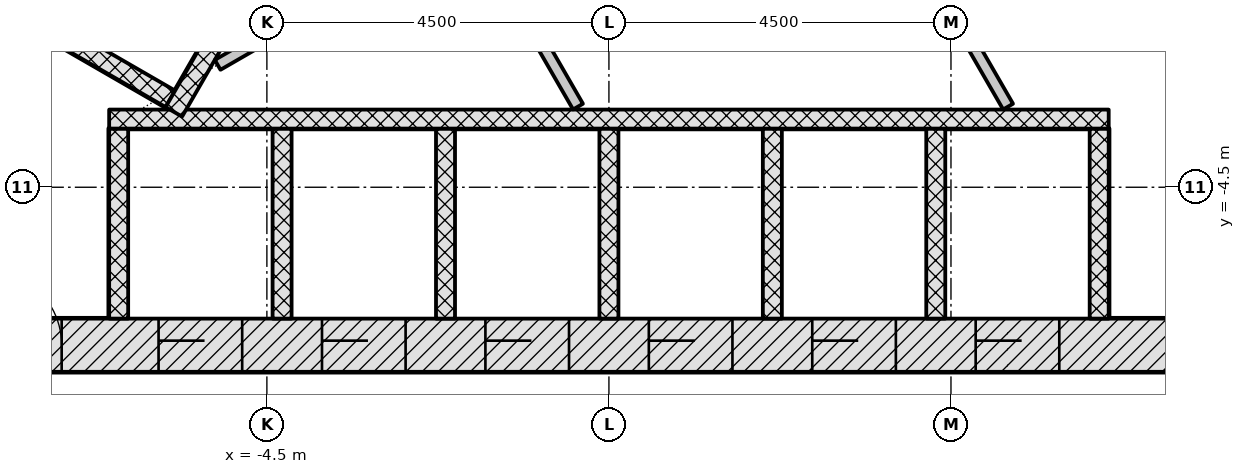
"""IFC4 building model, lengths in metres.
Left out: names, types, materials, properties, quantities, classifications, styles, units other than length and angle.
Written with IfcOpenShell. Run it as: python <this file> out.ifc"""

import sys

from ifc_helpers import new_model, si_unit, direction, frame, frame_2d, origin, place, context, subcontext, project, spatial, rectangle, extrude, element, fill, save


model = new_model("IFC4")
c1 = context("Model", 3, precision=1e-05, world=origin(), true_north=direction((0.0, 1.0)))
c2 = subcontext(c1, "Body", "Model", "MODEL_VIEW")
j1 = project(units=[si_unit("LENGTHUNIT", "METRE"), si_unit("PLANEANGLEUNIT", "RADIAN")], contexts=[c1])
p1 = place(None, origin())
s1 = spatial("IfcSite", under=j1, at=p1, CompositionType="ELEMENT")
p2 = place(p1, origin())
s2 = spatial("IfcBuilding", under=s1, at=p2, CompositionType="ELEMENT")
p3 = place(p2, frame((0.0, 0.0, 72.6)))
s3 = spatial("IfcBuildingStorey", under=s2, at=p3, CompositionType="ELEMENT", Elevation=72.6)
p4 = place(p3, frame((-9.229, -6.578, -0.2), z_axis=(0.0, 0.0, 1.0), x_axis=(1.0, 0.0, 0.0)))
e1 = element("IfcWall", 1, at=p4, inside=s3, PredefinedType="SHEAR", context=c2, shape_type="SweptSolid", body=[
    extrude(rectangle(XDim=18.458, YDim=0.7, at=frame_2d((9.229, 0.0))), origin(), (0.0, 0.0, 1.0), 3.6),
])
p5 = place(p4, frame((3.304, 0.0, 0.2)))
e2 = element("IfcOpeningElement", 2, at=p5, cuts=e1, PredefinedType="OPENING", context=c2, shape_type="SweptSolid", body=[
    extrude(rectangle(XDim=1.1, YDim=2.1, at=frame_2d((0.55, 1.05))), frame((0.0, 0.36, 0.0), z_axis=(0.0, -1.0, 0.0), x_axis=(1.0, 0.0, 0.0)), (0.0, 0.0, 1.0), 0.72),
])
p6 = place(p4, frame((5.454, 0.0, 0.2)))
e3 = element("IfcOpeningElement", 3, at=p6, cuts=e1, PredefinedType="OPENING", context=c2, shape_type="SweptSolid", body=[
    extrude(rectangle(XDim=1.1, YDim=2.1, at=frame_2d((0.55, 1.05))), frame((0.0, 0.36, 0.0), z_axis=(0.0, -1.0, 0.0), x_axis=(1.0, 0.0, 0.0)), (0.0, 0.0, 1.0), 0.72),
])
p7 = place(p4, frame((7.604, 0.0, 0.2)))
e4 = element("IfcOpeningElement", 4, at=p7, cuts=e1, PredefinedType="OPENING", context=c2, shape_type="SweptSolid", body=[
    extrude(rectangle(XDim=1.1, YDim=2.1, at=frame_2d((0.55, 1.05))), frame((0.0, 0.36, 0.0), z_axis=(0.0, -1.0, 0.0), x_axis=(1.0, 0.0, 0.0)), (0.0, 0.0, 1.0), 0.72),
])
p8 = place(p4, frame((9.754, 0.0, 0.2)))
e5 = element("IfcOpeningElement", 5, at=p8, cuts=e1, PredefinedType="OPENING", context=c2, shape_type="SweptSolid", body=[
    extrude(rectangle(XDim=1.1, YDim=2.1, at=frame_2d((0.55, 1.05))), frame((0.0, 0.36, 0.0), z_axis=(0.0, -1.0, 0.0), x_axis=(1.0, 0.0, 0.0)), (0.0, 0.0, 1.0), 0.72),
])
p9 = place(p4, frame((11.904, 0.0, 0.2)))
e6 = element("IfcOpeningElement", 6, at=p9, cuts=e1, PredefinedType="OPENING", context=c2, shape_type="SweptSolid", body=[
    extrude(rectangle(XDim=1.1, YDim=2.1, at=frame_2d((0.55, 1.05))), frame((0.0, 0.36, 0.0), z_axis=(0.0, -1.0, 0.0), x_axis=(1.0, 0.0, 0.0)), (0.0, 0.0, 1.0), 0.72),
])
p10 = place(p4, frame((14.054, 0.0, 0.2)))
e7 = element("IfcOpeningElement", 7, at=p10, cuts=e1, PredefinedType="OPENING", context=c2, shape_type="SweptSolid", body=[
    extrude(rectangle(XDim=1.1, YDim=2.1, at=frame_2d((0.55, 1.05))), frame((0.0, 0.36, 0.0), z_axis=(0.0, -1.0, 0.0), x_axis=(1.0, 0.0, 0.0)), (0.0, 0.0, 1.0), 0.72),
])
p11 = place(p4, frame((1.029, 0.0, 0.2)))
e8 = element("IfcOpeningElement", 8, at=p11, cuts=e1, PredefinedType="OPENING", context=c2, shape_type="SweptSolid", body=[
    extrude(rectangle(XDim=1.0, YDim=2.1, at=frame_2d((0.5, 1.05))), frame((0.0, 0.36, 0.0), z_axis=(0.0, -1.0, 0.0), x_axis=(1.0, 0.0, 0.0)), (0.0, 0.0, 1.0), 0.72),
])
p12 = place(p3, frame((10.311, -4.703, -0.2), z_axis=(0.0, 0.0, 1.0), x_axis=(-0.500001446645, 0.866024568562, 0.0)))
e9 = element("IfcWall", 9, at=p12, inside=s3, PredefinedType="SHEAR", context=c2, shape_type="SweptSolid", body=[
    extrude(rectangle(XDim=18.458, YDim=0.7, at=frame_2d((9.229, 0.0))), origin(), (0.0, 0.0, 1.0), 3.6),
])
p13 = place(p12, frame((9.5, 0.0, 0.2)))
e10 = element("IfcOpeningElement", 10, at=p13, cuts=e9, PredefinedType="OPENING", context=c2, shape_type="SweptSolid", body=[
    extrude(rectangle(XDim=1.0, YDim=2.1, at=frame_2d((0.5, 1.05))), frame((0.0, 0.36, 0.0), z_axis=(0.0, -1.0, 0.0), x_axis=(1.0, 0.0, 0.0)), (0.0, 0.0, 1.0), 0.72),
])
p14 = place(p12, frame((4.402, 0.0, 0.2)))
e11 = element("IfcOpeningElement", 11, at=p14, cuts=e9, PredefinedType="OPENING", context=c2, shape_type="SweptSolid", body=[
    extrude(rectangle(XDim=0.9, YDim=2.1, at=frame_2d((0.45, 1.05))), frame((0.0, 0.36, 0.0), z_axis=(0.0, -1.0, 0.0), x_axis=(1.0, 0.0, 0.0)), (0.0, 0.0, 1.0), 0.72),
])
p15 = place(p12, frame((13.927, 0.0, 0.2)))
e12 = element("IfcOpeningElement", 12, at=p15, cuts=e9, PredefinedType="OPENING", context=c2, shape_type="SweptSolid", body=[
    extrude(rectangle(XDim=0.9, YDim=2.1, at=frame_2d((0.45, 1.05))), frame((0.0, 0.36, 0.0), z_axis=(0.0, -1.0, 0.0), x_axis=(1.0, 0.0, 0.0)), (0.0, 0.0, 1.0), 0.72),
])
p16 = place(p3, frame((-1.083, 11.281, -0.2), z_axis=(0.0, 0.0, 1.0), x_axis=(-0.500001446645, -0.866024568562, 0.0)))
e13 = element("IfcWall", 13, at=p16, inside=s3, PredefinedType="SHEAR", context=c2, shape_type="SweptSolid", body=[
    extrude(rectangle(XDim=18.458, YDim=0.7, at=frame_2d((9.229, 0.0))), origin(), (0.0, 0.0, 1.0), 3.6),
])
p17 = place(p16, frame((8.979, 0.0, 0.2)))
e14 = element("IfcOpeningElement", 14, at=p17, cuts=e13, PredefinedType="OPENING", context=c2, shape_type="SweptSolid", body=[
    extrude(rectangle(XDim=1.2, YDim=2.1, at=frame_2d((0.6, 1.05))), frame((0.0, 0.36, 0.0), z_axis=(0.0, -1.0, 0.0), x_axis=(1.0, 0.0, 0.0)), (0.0, 0.0, 1.0), 0.72),
])
p18 = place(p16, frame((11.029, 0.0, 0.2)))
e15 = element("IfcOpeningElement", 15, at=p18, cuts=e13, PredefinedType="OPENING", context=c2, shape_type="SweptSolid", body=[
    extrude(rectangle(XDim=1.2, YDim=2.1, at=frame_2d((0.6, 1.05))), frame((0.0, 0.36, 0.0), z_axis=(0.0, -1.0, 0.0), x_axis=(1.0, 0.0, 0.0)), (0.0, 0.0, 1.0), 0.72),
])
for number, where, z_axis, x_axis in (
    (16, (-6.45, -6.228, -0.2), (0.0, 0.0, 1.0), (0.0, 1.0, 0.0)),
    (17, (-4.3, -6.228, -0.2), (0.0, 0.0, 1.0), (0.0, 1.0, 0.0)),
    (18, (-2.15, -6.228, -0.2), (0.0, 0.0, 1.0), (0.0, 1.0, 0.0)),
    (19, (0.0, -6.228, -0.2), (0.0, 0.0, 1.0), (0.0, 1.0, 0.0)),
    (20, (2.15, -6.228, -0.2), (0.0, 0.0, 1.0), (0.0, 1.0, 0.0)),
    (21, (4.3, -6.228, -0.2), (0.0, 0.0, 1.0), (0.0, 1.0, 0.0)),
    (22, (6.45, -6.228, -0.2), (0.0, 0.0, 1.0), (0.0, 1.0, 0.0)),
):
    element("IfcWall", number, at=place(p3, frame(where, z_axis=z_axis, x_axis=x_axis)), inside=s3, PredefinedType="PARTITIONING", context=c2, shape_type="SweptSolid", body=[
        extrude(rectangle(XDim=2.5, YDim=0.25, at=frame_2d((1.25, 0.0))), origin(), (0.0, 0.0, 1.0), 3.6),
    ])
p19 = place(p3, frame((-6.575, -3.603, 0.0), z_axis=(0.0, 0.0, 1.0), x_axis=(1.0, 0.0, 0.0)))
e23 = element("IfcWall", 23, at=p19, inside=s3, PredefinedType="PARTITIONING", context=c2, shape_type="SweptSolid", body=[
    extrude(rectangle(XDim=13.15, YDim=0.25, at=frame_2d((6.575, 0.0))), origin(), (0.0, 0.0, 1.0), 3.4),
])
p20 = place(p3, frame((-8.281, -1.887, -0.2), z_axis=(0.0, 0.0, 1.0), x_axis=(0.866032775405, -0.499987231761, 0.0)))
e24 = element("IfcWall", 24, at=p20, inside=s3, PredefinedType="PARTITIONING", context=c2, shape_type="SweptSolid", body=[
    extrude(rectangle(XDim=2.9, YDim=0.25, at=frame_2d((1.45, 0.0))), origin(), (0.0, 0.0, 1.0), 3.6),
])
p21 = place(p3, frame((0.176, 6.711, 0.0), z_axis=(0.0, 0.0, 1.0), x_axis=(-0.500004227369, -0.866022963098, 0.0)))
e25 = element("IfcWall", 25, at=p21, inside=s3, PredefinedType="PARTITIONING", context=c2, shape_type="SweptSolid", body=[
    extrude(rectangle(XDim=11.8, YDim=0.25, at=frame_2d((5.9, 0.0))), origin(), (0.0, 0.0, 1.0), 3.4),
])
p22 = place(p3, frame((-5.148, -2.89, 0.0), z_axis=(0.0, 0.0, 1.0), x_axis=(0.866030081544, 0.499991897794, 0.0)))
e26 = element("IfcWall", 26, at=p22, inside=s3, PredefinedType="PARTITIONING", context=c2, shape_type="SweptSolid", body=[
    extrude(rectangle(XDim=12.131, YDim=0.15, at=frame_2d((6.065, 0.0))), origin(), (0.0, 0.0, 1.0), 3.4),
])
p23 = place(p22, frame((5.831, 0.0, 0.0)))
e27 = element("IfcOpeningElement", 27, at=p23, cuts=e26, PredefinedType="OPENING", context=c2, shape_type="SweptSolid", body=[
    extrude(rectangle(XDim=0.9, YDim=2.1, at=frame_2d((0.45, 1.05))), frame((0.0, 0.085, 0.0), z_axis=(0.0, -1.0, 0.0), x_axis=(1.0, 0.0, 0.0)), (0.0, 0.0, 1.0), 0.17),
])
p24 = place(p22, frame((1.467, 0.0, 0.0)))
e28 = element("IfcOpeningElement", 28, at=p24, cuts=e26, PredefinedType="OPENING", context=c2, shape_type="SweptSolid", body=[
    extrude(rectangle(XDim=0.9, YDim=2.1, at=frame_2d((0.45, 1.05))), frame((0.0, 0.085, 0.0), z_axis=(0.0, -1.0, 0.0), x_axis=(1.0, 0.0, 0.0)), (0.0, 0.0, 1.0), 0.17),
])
p25 = place(p3, frame((-0.407, -3.439, 0.0), z_axis=(0.0, 0.0, 1.0), x_axis=(-0.500004591975, 0.86602275259, 0.0)))
e29 = element("IfcWall", 29, at=p25, inside=s3, PredefinedType="PARTITIONING", context=c2, shape_type="SweptSolid", body=[
    extrude(rectangle(XDim=2.771, YDim=0.15, at=frame_2d((1.386, 0.0))), origin(), (0.0, 0.0, 1.0), 3.4),
])
p26 = place(p3, frame((5.251, -3.439, 0.0), z_axis=(0.0, 0.0, 1.0), x_axis=(-0.500011755427, 0.866018616679, 0.0)))
e30 = element("IfcWall", 30, at=p26, inside=s3, PredefinedType="PARTITIONING", context=c2, shape_type="SweptSolid", body=[
    extrude(rectangle(XDim=5.6, YDim=0.15, at=frame_2d((2.8, 0.0))), origin(), (0.0, 0.0, 1.0), 3.4),
])
p27 = place(p3, frame((-16.256, -3.149, 0.0), z_axis=(0.0, 0.0, 1.0), x_axis=(0.499999683919, 0.866025586274, 0.0)))
e31 = element("IfcWall", 31, at=p27, inside=s3, PredefinedType="PARTITIONING", context=c2, shape_type="SweptSolid", body=[
    extrude(rectangle(XDim=22.234, YDim=0.15, at=frame_2d((11.117, 0.0))), origin(), (0.0, 0.0, 1.0), 2.778),
])
p28 = place(p27, frame((13.551, 0.0, 0.0)))
e32 = element("IfcOpeningElement", 32, at=p28, cuts=e31, PredefinedType="OPENING", context=c2, shape_type="SweptSolid", body=[
    extrude(rectangle(XDim=1.0, YDim=2.1, at=frame_2d((0.5, 1.05))), frame((0.0, 0.085, 0.0), z_axis=(0.0, -1.0, 0.0), x_axis=(1.0, 0.0, 0.0)), (0.0, 0.0, 1.0), 0.17),
])
p29 = place(p27, frame((5.647, 0.0, 0.0)))
e33 = element("IfcOpeningElement", 33, at=p29, cuts=e31, PredefinedType="OPENING", context=c2, shape_type="SweptSolid", body=[
    extrude(rectangle(XDim=1.5, YDim=2.1, at=frame_2d((0.75, 1.05))), frame((0.0, 0.085, 0.0), z_axis=(0.0, -1.0, 0.0), x_axis=(1.0, 0.0, 0.0)), (0.0, 0.0, 1.0), 0.17),
])
p30 = place(p3, frame((5.346, 8.446, 0.0), z_axis=(0.0, 0.0, 1.0), x_axis=(0.500008781656, -0.866020333634, 0.0)))
e34 = element("IfcWall", 34, at=p30, inside=s3, PredefinedType="PARTITIONING", context=c2, shape_type="SweptSolid", body=[
    extrude(rectangle(XDim=15.057, YDim=0.15, at=frame_2d((7.528, 0.0))), origin(), (0.0, 0.0, 1.0), 2.778),
])
p31 = place(p30, frame((12.55, 0.0, 0.0)))
e35 = element("IfcOpeningElement", 35, at=p31, cuts=e34, PredefinedType="OPENING", context=c2, shape_type="SweptSolid", body=[
    extrude(rectangle(XDim=1.0, YDim=2.1, at=frame_2d((0.5, 1.05))), frame((0.0, 0.085, 0.0), z_axis=(0.0, -1.0, 0.0), x_axis=(1.0, 0.0, 0.0)), (0.0, 0.0, 1.0), 0.17),
])
p32 = place(p30, frame((6.753, 0.0, 0.0)))
e36 = element("IfcOpeningElement", 36, at=p32, cuts=e34, PredefinedType="OPENING", context=c2, shape_type="SweptSolid", body=[
    extrude(rectangle(XDim=1.0, YDim=2.1, at=frame_2d((0.5, 1.05))), frame((0.0, 0.085, 0.0), z_axis=(0.0, -1.0, 0.0), x_axis=(1.0, 0.0, 0.0)), (0.0, 0.0, 1.0), 0.17),
])
p33 = place(p5, origin())
e37 = element("IfcDoor", 37, at=p33, inside=s3, OperationType="DOUBLE_DOOR_SLIDING", PredefinedType="DOOR", context=c2, shape_type="SweptSolid", body=[
    extrude(rectangle(XDim=1.1, YDim=2.1, at=frame_2d((0.55, 1.05))), frame((0.0, 0.025, 0.0), z_axis=(0.0, -1.0, 0.0), x_axis=(1.0, 0.0, 0.0)), (0.0, 0.0, 1.0), 0.05),
])
fill(e2, e37)
p34 = place(p6, origin())
e38 = element("IfcDoor", 38, at=p34, inside=s3, OperationType="DOUBLE_DOOR_SLIDING", PredefinedType="DOOR", context=c2, shape_type="SweptSolid", body=[
    extrude(rectangle(XDim=1.1, YDim=2.1, at=frame_2d((0.55, 1.05))), frame((0.0, 0.025, 0.0), z_axis=(0.0, -1.0, 0.0), x_axis=(1.0, 0.0, 0.0)), (0.0, 0.0, 1.0), 0.05),
])
fill(e3, e38)
p35 = place(p7, origin())
e39 = element("IfcDoor", 39, at=p35, inside=s3, OperationType="DOUBLE_DOOR_SLIDING", PredefinedType="DOOR", context=c2, shape_type="SweptSolid", body=[
    extrude(rectangle(XDim=1.1, YDim=2.1, at=frame_2d((0.55, 1.05))), frame((0.0, 0.025, 0.0), z_axis=(0.0, -1.0, 0.0), x_axis=(1.0, 0.0, 0.0)), (0.0, 0.0, 1.0), 0.05),
])
fill(e4, e39)
p36 = place(p8, origin())
e40 = element("IfcDoor", 40, at=p36, inside=s3, OperationType="DOUBLE_DOOR_SLIDING", PredefinedType="DOOR", context=c2, shape_type="SweptSolid", body=[
    extrude(rectangle(XDim=1.1, YDim=2.1, at=frame_2d((0.55, 1.05))), frame((0.0, 0.025, 0.0), z_axis=(0.0, -1.0, 0.0), x_axis=(1.0, 0.0, 0.0)), (0.0, 0.0, 1.0), 0.05),
])
fill(e5, e40)
p37 = place(p9, origin())
e41 = element("IfcDoor", 41, at=p37, inside=s3, OperationType="DOUBLE_DOOR_SLIDING", PredefinedType="DOOR", context=c2, shape_type="SweptSolid", body=[
    extrude(rectangle(XDim=1.1, YDim=2.1, at=frame_2d((0.55, 1.05))), frame((0.0, 0.025, 0.0), z_axis=(0.0, -1.0, 0.0), x_axis=(1.0, 0.0, 0.0)), (0.0, 0.0, 1.0), 0.05),
])
fill(e6, e41)
p38 = place(p10, origin())
e42 = element("IfcDoor", 42, at=p38, inside=s3, OperationType="DOUBLE_DOOR_SLIDING", PredefinedType="DOOR", context=c2, shape_type="SweptSolid", body=[
    extrude(rectangle(XDim=1.1, YDim=2.1, at=frame_2d((0.55, 1.05))), frame((0.0, 0.025, 0.0), z_axis=(0.0, -1.0, 0.0), x_axis=(1.0, 0.0, 0.0)), (0.0, 0.0, 1.0), 0.05),
])
fill(e7, e42)
p39 = place(p11, origin())
e43 = element("IfcDoor", 43, at=p39, inside=s3, OperationType="SINGLE_SWING_LEFT", PredefinedType="DOOR", context=c2, shape_type="SweptSolid", body=[
    extrude(rectangle(XDim=1.0, YDim=2.1, at=frame_2d((0.5, 1.05))), frame((0.0, 0.075, 0.0), z_axis=(0.0, -1.0, 0.0), x_axis=(1.0, 0.0, 0.0)), (0.0, 0.0, 1.0), 0.15),
])
fill(e8, e43)
save(model, sys.argv[1])
